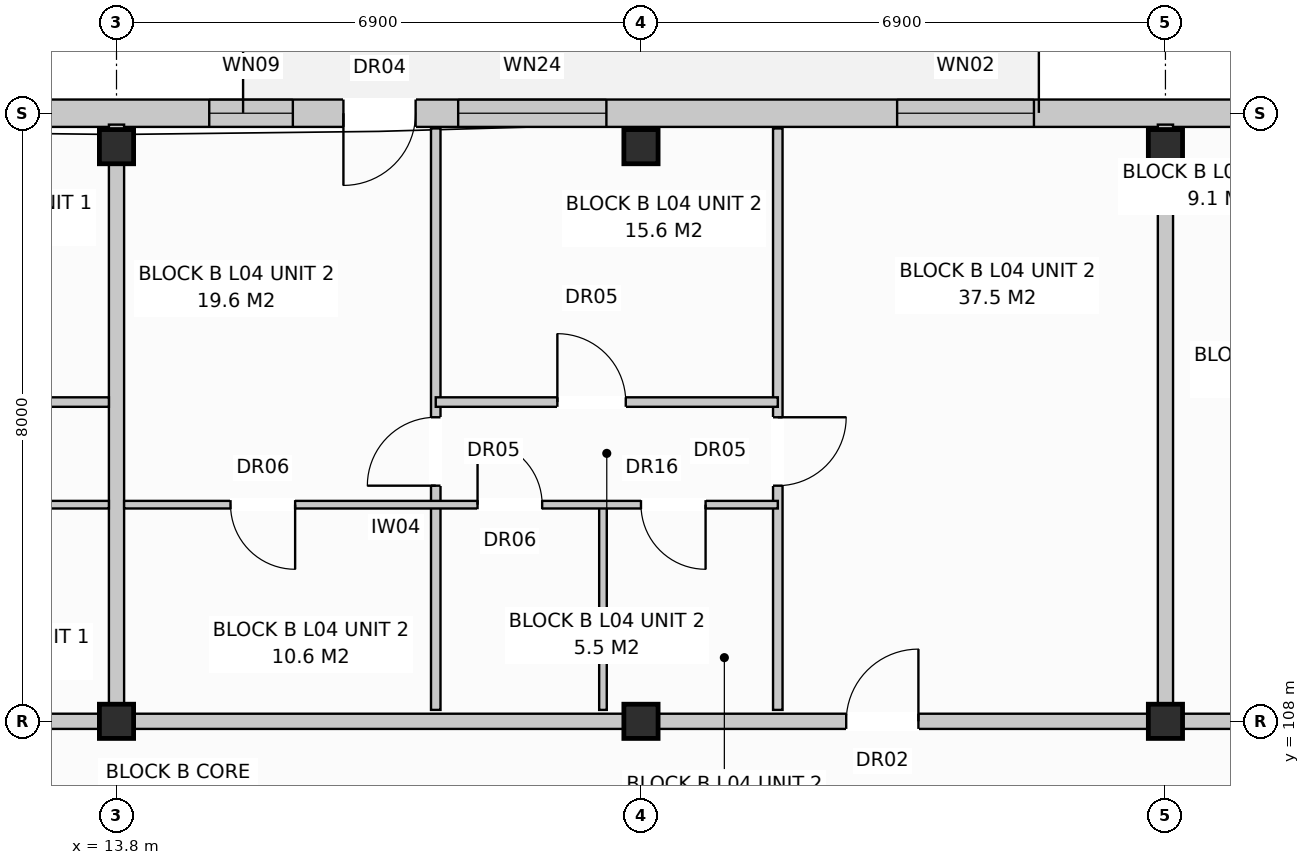
"""IFC4 building model, lengths in metres.
Left out: names, types, materials, properties, quantities, classifications, styles, units other than length and angle.
Written with IfcOpenShell. Run it as: python <this file> out.ifc"""

import sys

from ifc_helpers import new_model, si_unit, direction, frame, frame_2d, origin, origin_with_axes, origin_2d, place, context, subcontext, project, spatial, rectangle, extrude, element, fill, save


model = new_model("IFC4")
c1 = context("Model", 3, precision=1e-05, world=origin(), true_north=direction((0.0, 1.0)))
c2 = subcontext(c1, "Body", "Model", "MODEL_VIEW")
j1 = project(units=[si_unit("LENGTHUNIT", "METRE"), si_unit("PLANEANGLEUNIT", "RADIAN")], contexts=[c1])
p1 = place(None, origin())
s1 = spatial("IfcSite", under=j1, at=p1, CompositionType="ELEMENT")
p2 = place(p1, origin())
s2 = spatial("IfcBuilding", under=s1, at=p2, CompositionType="ELEMENT")
p3 = place(p2, frame((0.0, 0.0, 14.4)))
s3 = spatial("IfcBuildingStorey", under=s2, at=p3, CompositionType="ELEMENT", Elevation=14.4)
for number, where, z_axis, x_axis in (
    (1, (13.8, 108.0, 0.0), (0.0, 0.0, 1.0), (1.0, 0.0, 0.0)),
    (2, (13.8, 115.56, 0.0), (0.0, 0.0, 1.0), (1.0, 0.0, 0.0)),
    (3, (20.7, 108.0, 0.0), (0.0, 0.0, 1.0), (1.0, 0.0, 0.0)),
    (4, (20.7, 115.56, 0.0), (0.0, 0.0, 1.0), (1.0, 0.0, 0.0)),
    (5, (27.6, 108.0, 0.0), (0.0, 0.0, 1.0), (1.0, 0.0, 0.0)),
    (6, (27.6, 115.56, 0.0), (0.0, 0.0, 1.0), (1.0, 0.0, 0.0)),
):
    element("IfcColumn", number, at=place(p3, frame(where, z_axis=z_axis, x_axis=x_axis)), inside=s3, PredefinedType="COLUMN", context=c2, shape_type="SweptSolid", body=[
        extrude(rectangle(XDim=0.45, YDim=0.45, at=origin_2d()), origin(), (0.0, 0.0, 1.0), 3.2),
    ])
p4 = place(p3, frame((0.17, 116.0, 0.0), z_axis=(0.0, 0.0, 1.0), x_axis=(1.0, 0.0, 0.0)))
e7 = element("IfcWall", 7, at=p4, inside=s3, PredefinedType="STANDARD", context=c2, shape_type="SweptSolid", body=[
    extrude(rectangle(XDim=54.86, YDim=0.36, at=frame_2d((27.43, 0.0))), origin(), (0.0, 0.0, 1.0), 2.94),
])
p5 = place(p4, frame((3.815, 0.0, 0.0)))
e8 = element("IfcOpeningElement", 8, at=p5, cuts=e7, PredefinedType="OPENING", context=c2, shape_type="SweptSolid", body=[
    extrude(rectangle(XDim=0.95, YDim=2.1, at=frame_2d((0.475, 1.05))), frame((0.0, 0.192, 0.0), z_axis=(0.0, -1.0, 0.0), x_axis=(1.0, 0.0, 0.0)), (0.0, 0.0, 1.0), 0.384),
])
p6 = place(p4, frame((16.615, 0.0, 0.0)))
e9 = element("IfcOpeningElement", 9, at=p6, cuts=e7, PredefinedType="OPENING", context=c2, shape_type="SweptSolid", body=[
    extrude(rectangle(XDim=0.95, YDim=2.1, at=frame_2d((0.475, 1.05))), frame((0.0, 0.192, 0.0), z_axis=(0.0, -1.0, 0.0), x_axis=(1.0, 0.0, 0.0)), (0.0, 0.0, 1.0), 0.384),
])
p7 = place(p4, frame((30.115, 0.0, 0.0)))
e10 = element("IfcOpeningElement", 10, at=p7, cuts=e7, PredefinedType="OPENING", context=c2, shape_type="SweptSolid", body=[
    extrude(rectangle(XDim=0.95, YDim=2.1, at=frame_2d((0.475, 1.05))), frame((0.0, 0.192, 0.0), z_axis=(0.0, -1.0, 0.0), x_axis=(1.0, 0.0, 0.0)), (0.0, 0.0, 1.0), 0.384),
])
p8 = place(p4, frame((45.228, 0.0, 0.0)))
e11 = element("IfcOpeningElement", 11, at=p8, cuts=e7, PredefinedType="OPENING", context=c2, shape_type="SweptSolid", body=[
    extrude(rectangle(XDim=0.95, YDim=2.1, at=frame_2d((0.475, 1.05))), frame((0.0, 0.192, 0.0), z_axis=(0.0, -1.0, 0.0), x_axis=(1.0, 0.0, 0.0)), (0.0, 0.0, 1.0), 0.384),
])
p9 = place(p4, frame((1.55, 0.0, 0.8)))
e12 = element("IfcOpeningElement", 12, at=p9, cuts=e7, PredefinedType="OPENING", context=c2, shape_type="SweptSolid", body=[
    extrude(rectangle(XDim=1.9, YDim=1.85, at=frame_2d((0.95, 0.925))), frame((0.0, 0.192, 0.0), z_axis=(0.0, -1.0, 0.0), x_axis=(1.0, 0.0, 0.0)), (0.0, 0.0, 1.0), 0.384),
])
p10 = place(p4, frame((7.183, 0.0, 0.8)))
e13 = element("IfcOpeningElement", 13, at=p10, cuts=e7, PredefinedType="OPENING", context=c2, shape_type="SweptSolid", body=[
    extrude(rectangle(XDim=1.95, YDim=1.65, at=frame_2d((0.975, 0.825))), frame((0.0, 0.192, 0.0), z_axis=(0.0, -1.0, 0.0), x_axis=(1.0, 0.0, 0.0)), (0.0, 0.0, 1.0), 0.384),
])
p11 = place(p4, frame((10.85, 0.0, 0.72)))
e14 = element("IfcOpeningElement", 14, at=p11, cuts=e7, PredefinedType="OPENING", context=c2, shape_type="SweptSolid", body=[
    extrude(rectangle(XDim=1.1, YDim=1.5, at=frame_2d((0.55, 0.75))), frame((0.0, 0.192, 0.0), z_axis=(0.0, -1.0, 0.0), x_axis=(1.0, 0.0, 0.0)), (0.0, 0.0, 1.0), 0.384),
])
p12 = place(p4, frame((14.85, 0.0, 0.72)))
e15 = element("IfcOpeningElement", 15, at=p12, cuts=e7, PredefinedType="OPENING", context=c2, shape_type="SweptSolid", body=[
    extrude(rectangle(XDim=1.1, YDim=1.5, at=frame_2d((0.55, 0.75))), frame((0.0, 0.192, 0.0), z_axis=(0.0, -1.0, 0.0), x_axis=(1.0, 0.0, 0.0)), (0.0, 0.0, 1.0), 0.384),
])
p13 = place(p4, frame((18.125, 0.0, 0.8)))
e16 = element("IfcOpeningElement", 16, at=p13, cuts=e7, PredefinedType="OPENING", context=c2, shape_type="SweptSolid", body=[
    extrude(rectangle(XDim=1.95, YDim=1.65, at=frame_2d((0.975, 0.825))), frame((0.0, 0.192, 0.0), z_axis=(0.0, -1.0, 0.0), x_axis=(1.0, 0.0, 0.0)), (0.0, 0.0, 1.0), 0.384),
])
p14 = place(p4, frame((23.9, 0.0, 0.8)))
e17 = element("IfcOpeningElement", 17, at=p14, cuts=e7, PredefinedType="OPENING", context=c2, shape_type="SweptSolid", body=[
    extrude(rectangle(XDim=1.8, YDim=1.7, at=frame_2d((0.9, 0.85))), frame((0.0, 0.192, 0.0), z_axis=(0.0, -1.0, 0.0), x_axis=(1.0, 0.0, 0.0)), (0.0, 0.0, 1.0), 0.384),
])
p15 = place(p4, frame((28.35, 0.0, 0.72)))
e18 = element("IfcOpeningElement", 18, at=p15, cuts=e7, PredefinedType="OPENING", context=c2, shape_type="SweptSolid", body=[
    extrude(rectangle(XDim=1.1, YDim=1.5, at=frame_2d((0.55, 0.75))), frame((0.0, 0.192, 0.0), z_axis=(0.0, -1.0, 0.0), x_axis=(1.0, 0.0, 0.0)), (0.0, 0.0, 1.0), 0.384),
])
p16 = place(p4, frame((31.825, 0.0, 0.8)))
e19 = element("IfcOpeningElement", 19, at=p16, cuts=e7, PredefinedType="OPENING", context=c2, shape_type="SweptSolid", body=[
    extrude(rectangle(XDim=1.95, YDim=1.65, at=frame_2d((0.975, 0.825))), frame((0.0, 0.192, 0.0), z_axis=(0.0, -1.0, 0.0), x_axis=(1.0, 0.0, 0.0)), (0.0, 0.0, 1.0), 0.384),
])
p17 = place(p4, frame((35.4, 0.0, 0.8)))
e20 = element("IfcOpeningElement", 20, at=p17, cuts=e7, PredefinedType="OPENING", context=c2, shape_type="SweptSolid", body=[
    extrude(rectangle(XDim=1.8, YDim=1.7, at=frame_2d((0.9, 0.85))), frame((0.0, 0.192, 0.0), z_axis=(0.0, -1.0, 0.0), x_axis=(1.0, 0.0, 0.0)), (0.0, 0.0, 1.0), 0.384),
])
p18 = place(p4, frame((39.15, 0.0, 0.72)))
e21 = element("IfcOpeningElement", 21, at=p18, cuts=e7, PredefinedType="OPENING", context=c2, shape_type="SweptSolid", body=[
    extrude(rectangle(XDim=1.1, YDim=1.5, at=frame_2d((0.55, 0.75))), frame((0.0, 0.192, 0.0), z_axis=(0.0, -1.0, 0.0), x_axis=(1.0, 0.0, 0.0)), (0.0, 0.0, 1.0), 0.384),
])
p19 = place(p4, frame((43.35, 0.0, 0.72)))
e22 = element("IfcOpeningElement", 22, at=p19, cuts=e7, PredefinedType="OPENING", context=c2, shape_type="SweptSolid", body=[
    extrude(rectangle(XDim=1.1, YDim=1.5, at=frame_2d((0.55, 0.75))), frame((0.0, 0.192, 0.0), z_axis=(0.0, -1.0, 0.0), x_axis=(1.0, 0.0, 0.0)), (0.0, 0.0, 1.0), 0.384),
])
p20 = place(p4, frame((48.7, 0.0, 0.8)))
e23 = element("IfcOpeningElement", 23, at=p20, cuts=e7, PredefinedType="OPENING", context=c2, shape_type="SweptSolid", body=[
    extrude(rectangle(XDim=1.8, YDim=1.7, at=frame_2d((0.9, 0.85))), frame((0.0, 0.192, 0.0), z_axis=(0.0, -1.0, 0.0), x_axis=(1.0, 0.0, 0.0)), (0.0, 0.0, 1.0), 0.384),
])
p21 = place(p4, frame((52.25, 0.0, 0.72)))
e24 = element("IfcOpeningElement", 24, at=p21, cuts=e7, PredefinedType="OPENING", context=c2, shape_type="SweptSolid", body=[
    extrude(rectangle(XDim=1.1, YDim=1.5, at=frame_2d((0.55, 0.75))), frame((0.0, 0.192, 0.0), z_axis=(0.0, -1.0, 0.0), x_axis=(1.0, 0.0, 0.0)), (0.0, 0.0, 1.0), 0.384),
])
p22 = place(p3, frame((13.8, 108.15, 0.0), z_axis=(0.0, 0.0, 1.0), x_axis=(0.0, 1.0, 0.0)))
e25 = element("IfcWall", 25, at=p22, inside=s3, PredefinedType="PARTITIONING", context=c2, shape_type="SweptSolid", body=[
    extrude(rectangle(XDim=7.7, YDim=0.2, at=frame_2d((3.85, 0.0))), origin(), (0.0, 0.0, 1.0), 2.94),
])
p23 = place(p3, frame((0.0, 108.0, 0.0), z_axis=(0.0, 0.0, 1.0), x_axis=(1.0, 0.0, 0.0)))
e26 = element("IfcWall", 26, at=p23, inside=s3, PredefinedType="PARTITIONING", context=c2, shape_type="SweptSolid", body=[
    extrude(rectangle(XDim=13.8, YDim=0.2, at=frame_2d((6.9, 0.0))), origin(), (0.0, 0.0, 1.0), 2.38),
])
p24 = place(p23, frame((2.4, 0.0, 0.0)))
e27 = element("IfcOpeningElement", 27, at=p24, cuts=e26, PredefinedType="OPENING", context=c2, shape_type="SweptSolid", body=[
    extrude(rectangle(XDim=0.95, YDim=2.15, at=frame_2d((0.475, 1.075))), frame((0.0, 0.112, 0.0), z_axis=(0.0, -1.0, 0.0), x_axis=(1.0, 0.0, 0.0)), (0.0, 0.0, 1.0), 0.224),
])
p25 = place(p3, frame((5.2, 110.85, 0.0), z_axis=(0.0, 0.0, 1.0), x_axis=(1.0, 0.0, 0.0)))
e28 = element("IfcWall", 28, at=p25, inside=s3, PredefinedType="PARTITIONING", context=c2, shape_type="SweptSolid", body=[
    extrude(rectangle(XDim=8.5, YDim=0.1, at=frame_2d((4.25, 0.0))), origin(), (0.0, 0.0, 1.0), 2.94),
])
p26 = place(p25, frame((1.0, 0.0, 0.0)))
e29 = element("IfcOpeningElement", 29, at=p26, cuts=e28, PredefinedType="OPENING", context=c2, shape_type="SweptSolid", body=[
    extrude(rectangle(XDim=0.85, YDim=2.1, at=frame_2d((0.425, 1.05))), frame((0.0, 0.062, 0.0), z_axis=(0.0, -1.0, 0.0), x_axis=(1.0, 0.0, 0.0)), (0.0, 0.0, 1.0), 0.124),
])
p27 = place(p25, frame((3.4, 0.0, 0.0)))
e30 = element("IfcOpeningElement", 30, at=p27, cuts=e28, PredefinedType="OPENING", context=c2, shape_type="SweptSolid", body=[
    extrude(rectangle(XDim=0.85, YDim=2.05, at=frame_2d((0.425, 1.025))), frame((0.0, 0.062, 0.0), z_axis=(0.0, -1.0, 0.0), x_axis=(1.0, 0.0, 0.0)), (0.0, 0.0, 1.0), 0.124),
])
p28 = place(p25, frame((6.2, 0.0, 0.0)))
e31 = element("IfcOpeningElement", 31, at=p28, cuts=e28, PredefinedType="OPENING", context=c2, shape_type="SweptSolid", body=[
    extrude(rectangle(XDim=0.85, YDim=2.05, at=frame_2d((0.425, 1.025))), frame((0.0, 0.062, 0.0), z_axis=(0.0, -1.0, 0.0), x_axis=(1.0, 0.0, 0.0)), (0.0, 0.0, 1.0), 0.124),
])
p29 = place(p3, frame((5.2, 112.2, 0.0), z_axis=(0.0, 0.0, 1.0), x_axis=(1.0, 0.0, 0.0)))
e32 = element("IfcWall", 32, at=p29, inside=s3, PredefinedType="PARTITIONING", context=c2, shape_type="SweptSolid", body=[
    extrude(rectangle(XDim=8.5, YDim=0.125, at=frame_2d((4.25, 0.0))), origin(), (0.0, 0.0, 1.0), 2.94),
])
p30 = place(p29, frame((1.5, 0.0, 0.0)))
e33 = element("IfcOpeningElement", 33, at=p30, cuts=e32, PredefinedType="OPENING", context=c2, shape_type="SweptSolid", body=[
    extrude(rectangle(XDim=0.9, YDim=2.1, at=frame_2d((0.45, 1.05))), frame((0.0, 0.074, 0.0), z_axis=(0.0, -1.0, 0.0), x_axis=(1.0, 0.0, 0.0)), (0.0, 0.0, 1.0), 0.149),
])
p31 = place(p29, frame((5.6, 0.0, 0.0)))
e34 = element("IfcOpeningElement", 34, at=p31, cuts=e32, PredefinedType="OPENING", context=c2, shape_type="SweptSolid", body=[
    extrude(rectangle(XDim=0.9, YDim=2.1, at=frame_2d((0.45, 1.05))), frame((0.0, 0.074, 0.0), z_axis=(0.0, -1.0, 0.0), x_axis=(1.0, 0.0, 0.0)), (0.0, 0.0, 1.0), 0.149),
])
p32 = place(p3, frame((27.6, 108.15, 0.0), z_axis=(0.0, 0.0, 1.0), x_axis=(0.0, 1.0, 0.0)))
e35 = element("IfcWall", 35, at=p32, inside=s3, PredefinedType="PARTITIONING", context=c2, shape_type="SweptSolid", body=[
    extrude(rectangle(XDim=7.7, YDim=0.2, at=frame_2d((3.85, 0.0))), origin(), (0.0, 0.0, 1.0), 2.94),
])
p33 = place(p3, frame((13.8, 108.0, 0.0), z_axis=(0.0, 0.0, 1.0), x_axis=(1.0, 0.0, 0.0)))
e36 = element("IfcWall", 36, at=p33, inside=s3, PredefinedType="PARTITIONING", context=c2, shape_type="SweptSolid", body=[
    extrude(rectangle(XDim=13.8, YDim=0.2, at=frame_2d((6.9, 0.0))), origin(), (0.0, 0.0, 1.0), 2.38),
])
p34 = place(p33, frame((9.6, 0.0, 0.0)))
e37 = element("IfcOpeningElement", 37, at=p34, cuts=e36, PredefinedType="OPENING", context=c2, shape_type="SweptSolid", body=[
    extrude(rectangle(XDim=0.95, YDim=2.15, at=frame_2d((0.475, 1.075))), frame((0.0, 0.112, 0.0), z_axis=(0.0, -1.0, 0.0), x_axis=(1.0, 0.0, 0.0)), (0.0, 0.0, 1.0), 0.224),
])
p35 = place(p3, frame((22.5, 108.15, 0.0), z_axis=(0.0, 0.0, 1.0), x_axis=(0.0, 1.0, 0.0)))
e38 = element("IfcWall", 38, at=p35, inside=s3, PredefinedType="PARTITIONING", context=c2, shape_type="SweptSolid", body=[
    extrude(rectangle(XDim=7.65, YDim=0.125, at=frame_2d((3.825, 0.0))), origin(), (0.0, 0.0, 1.0), 2.94),
])
p36 = place(p35, frame((2.95, 0.0, 0.0)))
e39 = element("IfcOpeningElement", 39, at=p36, cuts=e38, PredefinedType="OPENING", context=c2, shape_type="SweptSolid", body=[
    extrude(rectangle(XDim=0.9, YDim=2.1, at=frame_2d((0.45, 1.05))), frame((0.0, 0.074, 0.0), z_axis=(0.0, -1.0, 0.0), x_axis=(1.0, 0.0, 0.0)), (0.0, 0.0, 1.0), 0.149),
])
p37 = place(p3, frame((18.0, 108.15, 0.0), z_axis=(0.0, 0.0, 1.0), x_axis=(0.0, 1.0, 0.0)))
e40 = element("IfcWall", 40, at=p37, inside=s3, PredefinedType="PARTITIONING", context=c2, shape_type="SweptSolid", body=[
    extrude(rectangle(XDim=7.65, YDim=0.125, at=frame_2d((3.825, 0.0))), origin(), (0.0, 0.0, 1.0), 2.94),
])
p38 = place(p37, frame((2.95, 0.0, 0.0)))
e41 = element("IfcOpeningElement", 41, at=p38, cuts=e40, PredefinedType="OPENING", context=c2, shape_type="SweptSolid", body=[
    extrude(rectangle(XDim=0.9, YDim=2.1, at=frame_2d((0.45, 1.05))), frame((0.0, 0.074, 0.0), z_axis=(0.0, -1.0, 0.0), x_axis=(1.0, 0.0, 0.0)), (0.0, 0.0, 1.0), 0.149),
])
p39 = place(p3, frame((20.2, 108.15, 0.0), z_axis=(0.0, 0.0, 1.0), x_axis=(0.0, 1.0, 0.0)))
e42 = element("IfcWall", 42, at=p39, inside=s3, PredefinedType="PARTITIONING", context=c2, shape_type="SweptSolid", body=[
    extrude(rectangle(XDim=2.7, YDim=0.1, at=frame_2d((1.35, 0.0))), origin(), (0.0, 0.0, 1.0), 2.94),
])
p40 = place(p3, frame((13.9, 110.85, 0.0), z_axis=(0.0, 0.0, 1.0), x_axis=(1.0, 0.0, 0.0)))
e43 = element("IfcWall", 43, at=p40, inside=s3, PredefinedType="PARTITIONING", context=c2, shape_type="SweptSolid", body=[
    extrude(rectangle(XDim=8.6, YDim=0.1, at=frame_2d((4.3, 0.0))), origin(), (0.0, 0.0, 1.0), 2.94),
])
p41 = place(p40, frame((1.4, 0.0, 0.0)))
e44 = element("IfcOpeningElement", 44, at=p41, cuts=e43, PredefinedType="OPENING", context=c2, shape_type="SweptSolid", body=[
    extrude(rectangle(XDim=0.85, YDim=2.05, at=frame_2d((0.425, 1.025))), frame((0.0, 0.062, 0.0), z_axis=(0.0, -1.0, 0.0), x_axis=(1.0, 0.0, 0.0)), (0.0, 0.0, 1.0), 0.124),
])
p42 = place(p40, frame((4.65, 0.0, 0.0)))
e45 = element("IfcOpeningElement", 45, at=p42, cuts=e43, PredefinedType="OPENING", context=c2, shape_type="SweptSolid", body=[
    extrude(rectangle(XDim=0.85, YDim=2.05, at=frame_2d((0.425, 1.025))), frame((0.0, 0.062, 0.0), z_axis=(0.0, -1.0, 0.0), x_axis=(1.0, 0.0, 0.0)), (0.0, 0.0, 1.0), 0.124),
])
p43 = place(p40, frame((6.8, 0.0, 0.0)))
e46 = element("IfcOpeningElement", 46, at=p43, cuts=e43, PredefinedType="OPENING", context=c2, shape_type="SweptSolid", body=[
    extrude(rectangle(XDim=0.85, YDim=2.1, at=frame_2d((0.425, 1.05))), frame((0.0, 0.062, 0.0), z_axis=(0.0, -1.0, 0.0), x_axis=(1.0, 0.0, 0.0)), (0.0, 0.0, 1.0), 0.124),
])
p44 = place(p3, frame((18.0, 112.2, 0.0), z_axis=(0.0, 0.0, 1.0), x_axis=(1.0, 0.0, 0.0)))
e47 = element("IfcWall", 47, at=p44, inside=s3, PredefinedType="PARTITIONING", context=c2, shape_type="SweptSolid", body=[
    extrude(rectangle(XDim=4.5, YDim=0.125, at=frame_2d((2.25, 0.0))), origin(), (0.0, 0.0, 1.0), 2.94),
])
p45 = place(p44, frame((1.6, 0.0, 0.0)))
e48 = element("IfcOpeningElement", 48, at=p45, cuts=e47, PredefinedType="OPENING", context=c2, shape_type="SweptSolid", body=[
    extrude(rectangle(XDim=0.9, YDim=2.1, at=frame_2d((0.45, 1.05))), frame((0.0, 0.074, 0.0), z_axis=(0.0, -1.0, 0.0), x_axis=(1.0, 0.0, 0.0)), (0.0, 0.0, 1.0), 0.149),
])
p46 = place(p3, frame((27.6, 108.0, 0.0), z_axis=(0.0, 0.0, 1.0), x_axis=(1.0, 0.0, 0.0)))
e49 = element("IfcWall", 49, at=p46, inside=s3, PredefinedType="PARTITIONING", context=c2, shape_type="SweptSolid", body=[
    extrude(rectangle(XDim=6.9, YDim=0.2, at=frame_2d((3.45, 0.0))), origin(), (0.0, 0.0, 1.0), 2.38),
])
p47 = place(p46, frame((2.0, 0.0, 0.0)))
e50 = element("IfcOpeningElement", 50, at=p47, cuts=e49, PredefinedType="OPENING", context=c2, shape_type="SweptSolid", body=[
    extrude(rectangle(XDim=0.95, YDim=2.15, at=frame_2d((0.475, 1.075))), frame((0.0, 0.112, 0.0), z_axis=(0.0, -1.0, 0.0), x_axis=(1.0, 0.0, 0.0)), (0.0, 0.0, 1.0), 0.224),
])
p48 = place(p6, frame((0.95, 0.0, 0.0), z_axis=(0.0, 0.0, 1.0), x_axis=(-1.0, 0.0, 0.0)))
e51 = element("IfcDoor", 51, at=p48, inside=s3, OperationType="SINGLE_SWING_LEFT", PredefinedType="DOOR", context=c2, shape_type="SweptSolid", body=[
    extrude(rectangle(XDim=0.95, YDim=2.1, at=frame_2d((0.475, 1.05))), frame((0.0, 0.025, 0.0), z_axis=(0.0, -1.0, 0.0), x_axis=(1.0, 0.0, 0.0)), (0.0, 0.0, 1.0), 0.05),
])
fill(e9, e51)
p49 = place(p12, origin_with_axes())
e52 = element("IfcWindow", 52, at=p49, inside=s3, PartitioningType="SINGLE_PANEL", PredefinedType="WINDOW", context=c2, shape_type="SweptSolid", body=[
    extrude(rectangle(XDim=1.1, YDim=1.5, at=frame_2d((0.55, 0.75))), frame((0.0, 0.03, 0.0), z_axis=(0.0, -1.0, 0.0), x_axis=(1.0, 0.0, 0.0)), (0.0, 0.0, 1.0), 0.06),
])
fill(e15, e52)
p50 = place(p13, origin_with_axes())
e53 = element("IfcWindow", 53, at=p50, inside=s3, PartitioningType="SINGLE_PANEL", PredefinedType="WINDOW", context=c2, shape_type="SweptSolid", body=[
    extrude(rectangle(XDim=1.95, YDim=1.65, at=frame_2d((0.975, 0.825))), frame((0.0, 0.03, 0.0), z_axis=(0.0, -1.0, 0.0), x_axis=(1.0, 0.0, 0.0)), (0.0, 0.0, 1.0), 0.06),
])
fill(e16, e53)
p51 = place(p14, origin_with_axes())
e54 = element("IfcWindow", 54, at=p51, inside=s3, PartitioningType="SINGLE_PANEL", PredefinedType="WINDOW", context=c2, shape_type="SweptSolid", body=[
    extrude(rectangle(XDim=1.8, YDim=1.7, at=frame_2d((0.9, 0.85))), frame((0.0, 0.03, 0.0), z_axis=(0.0, -1.0, 0.0), x_axis=(1.0, 0.0, 0.0)), (0.0, 0.0, 1.0), 0.06),
])
fill(e17, e54)
p52 = place(p34, origin_with_axes())
e55 = element("IfcDoor", 55, at=p52, inside=s3, OperationType="SINGLE_SWING_RIGHT", PredefinedType="DOOR", context=c2, shape_type="SweptSolid", body=[
    extrude(rectangle(XDim=0.95, YDim=2.15, at=frame_2d((0.475, 1.075))), frame((0.0, 0.025, 0.0), z_axis=(0.0, -1.0, 0.0), x_axis=(1.0, 0.0, 0.0)), (0.0, 0.0, 1.0), 0.05),
])
fill(e37, e55)
p53 = place(p36, frame((0.9, 0.0, 0.0), z_axis=(0.0, 0.0, 1.0), x_axis=(-1.0, 0.0, 0.0)))
e56 = element("IfcDoor", 56, at=p53, inside=s3, OperationType="SINGLE_SWING_RIGHT", PredefinedType="DOOR", context=c2, shape_type="SweptSolid", body=[
    extrude(rectangle(XDim=0.9, YDim=2.1, at=frame_2d((0.45, 1.05))), frame((0.0, 0.025, 0.0), z_axis=(0.0, -1.0, 0.0), x_axis=(1.0, 0.0, 0.0)), (0.0, 0.0, 1.0), 0.05),
])
fill(e39, e56)
p54 = place(p38, origin_with_axes())
e57 = element("IfcDoor", 57, at=p54, inside=s3, OperationType="SINGLE_SWING_LEFT", PredefinedType="DOOR", context=c2, shape_type="SweptSolid", body=[
    extrude(rectangle(XDim=0.9, YDim=2.1, at=frame_2d((0.45, 1.05))), frame((0.0, 0.025, 0.0), z_axis=(0.0, -1.0, 0.0), x_axis=(1.0, 0.0, 0.0)), (0.0, 0.0, 1.0), 0.05),
])
fill(e41, e57)
p55 = place(p41, frame((0.85, 0.0, 0.0), z_axis=(0.0, 0.0, 1.0), x_axis=(-1.0, 0.0, 0.0)))
e58 = element("IfcDoor", 58, at=p55, inside=s3, OperationType="SINGLE_SWING_RIGHT", PredefinedType="DOOR", context=c2, shape_type="SweptSolid", body=[
    extrude(rectangle(XDim=0.85, YDim=2.05, at=frame_2d((0.425, 1.025))), frame((0.0, 0.025, 0.0), z_axis=(0.0, -1.0, 0.0), x_axis=(1.0, 0.0, 0.0)), (0.0, 0.0, 1.0), 0.05),
])
fill(e44, e58)
p56 = place(p42, origin_with_axes())
e59 = element("IfcDoor", 59, at=p56, inside=s3, OperationType="SINGLE_SWING_LEFT", PredefinedType="DOOR", context=c2, shape_type="SweptSolid", body=[
    extrude(rectangle(XDim=0.85, YDim=2.05, at=frame_2d((0.425, 1.025))), frame((0.0, 0.025, 0.0), z_axis=(0.0, -1.0, 0.0), x_axis=(1.0, 0.0, 0.0)), (0.0, 0.0, 1.0), 0.05),
])
fill(e45, e59)
p57 = place(p43, frame((0.85, 0.0, 0.0), z_axis=(0.0, 0.0, 1.0), x_axis=(-1.0, 0.0, 0.0)))
e60 = element("IfcDoor", 60, at=p57, inside=s3, OperationType="SINGLE_SWING_RIGHT", PredefinedType="DOOR", context=c2, shape_type="SweptSolid", body=[
    extrude(rectangle(XDim=0.85, YDim=2.1, at=frame_2d((0.425, 1.05))), frame((0.0, 0.025, 0.0), z_axis=(0.0, -1.0, 0.0), x_axis=(1.0, 0.0, 0.0)), (0.0, 0.0, 1.0), 0.05),
])
fill(e46, e60)
p58 = place(p45, origin_with_axes())
e61 = element("IfcDoor", 61, at=p58, inside=s3, OperationType="SINGLE_SWING_LEFT", PredefinedType="DOOR", context=c2, shape_type="SweptSolid", body=[
    extrude(rectangle(XDim=0.9, YDim=2.1, at=frame_2d((0.45, 1.05))), frame((0.0, 0.025, 0.0), z_axis=(0.0, -1.0, 0.0), x_axis=(1.0, 0.0, 0.0)), (0.0, 0.0, 1.0), 0.05),
])
fill(e48, e61)
save(model, sys.argv[1])
